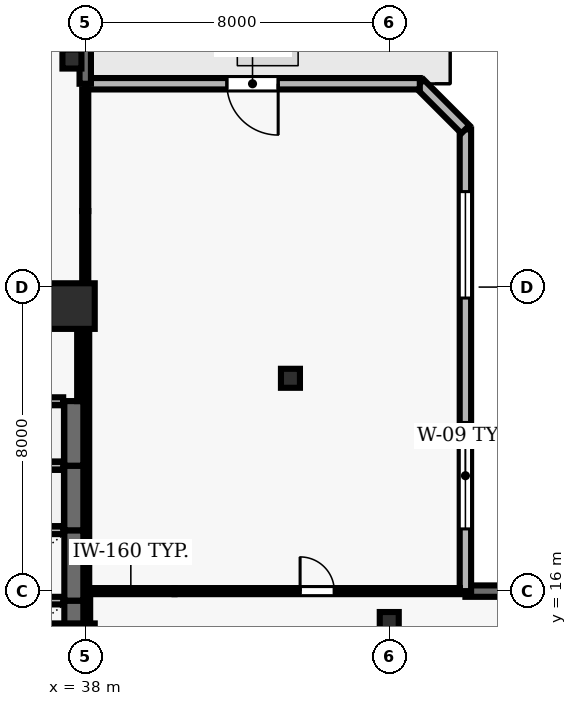
"""IFC4 building model, lengths in metres.
Left out: names, types, materials, properties, quantities, classifications, styles, units other than length and angle.
Written with IfcOpenShell. Run it as: python <this file> out.ifc"""

import sys

from ifc_helpers import new_model, si_unit, direction, frame, frame_2d, origin, origin_2d, place, context, subcontext, project, spatial, rectangle, hollow_rectangle, extrude, element, fill, save


model = new_model("IFC4")
c1 = context("Model", 3, precision=1e-05, world=origin(), true_north=direction((0.0, 1.0)))
c2 = subcontext(c1, "Body", "Model", "MODEL_VIEW")
j1 = project(units=[si_unit("LENGTHUNIT", "METRE"), si_unit("PLANEANGLEUNIT", "RADIAN")], contexts=[c1])
p1 = place(None, origin())
s1 = spatial("IfcSite", under=j1, at=p1, CompositionType="ELEMENT")
p2 = place(p1, origin())
s2 = spatial("IfcBuilding", under=s1, at=p2, CompositionType="ELEMENT")
p3 = place(p2, frame((0.0, 0.0, 115.1)))
s3 = spatial("IfcBuildingStorey", under=s2, at=p3, CompositionType="ELEMENT", Elevation=115.1)
for number, where, z_axis, x_axis in (
    (1, (37.65, 14.55, 0.0), (0.0, 0.0, 1.0), (1.0, 0.0, 0.0)),
    (2, (37.65, 23.5, 0.0), (0.0, 0.0, 1.0), (1.0, 0.0, 0.0)),
):
    element("IfcColumn", number, at=place(p3, frame(where, z_axis=z_axis, x_axis=x_axis)), inside=s3, PredefinedType="COLUMN", context=c2, shape_type="SweptSolid", body=[
        extrude(rectangle(XDim=1.2, YDim=1.2, at=origin_2d()), origin(), (0.0, 0.0, 1.0), 3.9),
    ])
for number, where, z_axis, x_axis in (
    (3, (46.0, 15.2, 0.0), (0.0, 0.0, 1.0), (1.0, 0.0, 0.0)),
    (4, (37.65, 30.0, 0.0), (0.0, 0.0, 1.0), (1.0, 0.0, 0.0)),
    (5, (43.4, 21.6, 0.0), (0.0, 0.0, 1.0), (1.0, 0.0, 0.0)),
):
    element("IfcColumn", number, at=place(p3, frame(where, z_axis=z_axis, x_axis=x_axis)), inside=s3, PredefinedType="COLUMN", context=c2, shape_type="SweptSolid", body=[
        extrude(hollow_rectangle(XDim=0.5, YDim=0.5, WallThickness=0.025, at=origin_2d()), origin(), (0.0, 0.0, 1.0), 3.9),
    ])
p4 = place(p3, frame((68.1, 16.0, 0.0), z_axis=(0.0, 0.0, 1.0), x_axis=(-1.0, 0.0, 0.0)))
e6 = element("IfcWall", 6, at=p4, inside=s3, PredefinedType="SOLIDWALL", context=c2, shape_type="SweptSolid", body=[
    extrude(rectangle(XDim=20.096, YDim=0.3, at=frame_2d((10.048, 0.0))), origin(), (0.0, 0.0, 1.0), 3.69),
])
p5 = place(p4, frame((6.922, 0.0, 0.0)))
e7 = element("IfcOpeningElement", 7, at=p5, cuts=e6, PredefinedType="OPENING", context=c2, shape_type="SweptSolid", body=[
    extrude(rectangle(XDim=1.0, YDim=2.2, at=frame_2d((0.5, 1.1))), frame((0.0, 0.16, 0.0), z_axis=(0.0, -1.0, 0.0), x_axis=(1.0, 0.0, 0.0)), (0.0, 0.0, 1.0), 0.32),
])
p6 = place(p4, frame((2.149, 0.0, 0.9)))
e8 = element("IfcOpeningElement", 8, at=p6, cuts=e6, PredefinedType="OPENING", context=c2, shape_type="SweptSolid", body=[
    extrude(rectangle(XDim=2.4, YDim=1.8, at=frame_2d((1.2, 0.9))), frame((0.0, 0.16, 0.0), z_axis=(0.0, -1.0, 0.0), x_axis=(1.0, 0.0, 0.0)), (0.0, 0.0, 1.0), 0.32),
])
p7 = place(p4, frame((8.848, 0.0, 0.9)))
e9 = element("IfcOpeningElement", 9, at=p7, cuts=e6, PredefinedType="OPENING", context=c2, shape_type="SweptSolid", body=[
    extrude(rectangle(XDim=2.4, YDim=1.8, at=frame_2d((1.2, 0.9))), frame((0.0, 0.16, 0.0), z_axis=(0.0, -1.0, 0.0), x_axis=(1.0, 0.0, 0.0)), (0.0, 0.0, 1.0), 0.32),
])
p8 = place(p4, frame((15.547, 0.0, 0.9)))
e10 = element("IfcOpeningElement", 10, at=p8, cuts=e6, PredefinedType="OPENING", context=c2, shape_type="SweptSolid", body=[
    extrude(rectangle(XDim=2.4, YDim=1.8, at=frame_2d((1.2, 0.9))), frame((0.0, 0.16, 0.0), z_axis=(0.0, -1.0, 0.0), x_axis=(1.0, 0.0, 0.0)), (0.0, 0.0, 1.0), 0.32),
])
p9 = place(p3, frame((48.004, 16.0, 0.0), z_axis=(0.0, 0.0, 1.0), x_axis=(0.0, 1.0, 0.0)))
e11 = element("IfcWall", 11, at=p9, inside=s3, PredefinedType="SOLIDWALL", context=c2, shape_type="SweptSolid", body=[
    extrude(rectangle(XDim=12.15, YDim=0.3, at=frame_2d((6.075, 0.0))), origin(), (0.0, 0.0, 1.0), 3.69),
])
p10 = place(p9, frame((1.637, 0.0, 0.9)))
e12 = element("IfcOpeningElement", 12, at=p10, cuts=e11, PredefinedType="OPENING", context=c2, shape_type="SweptSolid", body=[
    extrude(rectangle(XDim=2.8, YDim=1.8, at=frame_2d((1.4, 0.9))), frame((0.0, 0.16, 0.0), z_axis=(0.0, -1.0, 0.0), x_axis=(1.0, 0.0, 0.0)), (0.0, 0.0, 1.0), 0.32),
])
p11 = place(p9, frame((7.712, 0.0, 0.9)))
e13 = element("IfcOpeningElement", 13, at=p11, cuts=e11, PredefinedType="OPENING", context=c2, shape_type="SweptSolid", body=[
    extrude(rectangle(XDim=2.8, YDim=1.8, at=frame_2d((1.4, 0.9))), frame((0.0, 0.16, 0.0), z_axis=(0.0, -1.0, 0.0), x_axis=(1.0, 0.0, 0.0)), (0.0, 0.0, 1.0), 0.32),
])
p12 = place(p3, frame((48.004, 28.15, 0.0), z_axis=(0.0, 0.0, 1.0), x_axis=(-0.707034851297, 0.707178703759, 0.0)))
e14 = element("IfcWall", 14, at=p12, inside=s3, PredefinedType="SOLIDWALL", context=c2, shape_type="SweptSolid", body=[
    extrude(rectangle(XDim=1.697, YDim=0.3, at=frame_2d((0.849, 0.0))), origin(), (0.0, 0.0, 1.0), 3.69),
])
p13 = place(p3, frame((46.804, 29.35, 0.0), z_axis=(0.0, 0.0, 1.0), x_axis=(-1.0, 0.0, 0.0)))
e15 = element("IfcWall", 15, at=p13, inside=s3, PredefinedType="SOLIDWALL", context=c2, shape_type="SweptSolid", body=[
    extrude(rectangle(XDim=8.804, YDim=0.3, at=frame_2d((4.402, 0.0))), origin(), (0.0, 0.0, 1.0), 3.69),
])
p14 = place(p13, frame((3.727, 0.0, 0.0)))
e16 = element("IfcOpeningElement", 16, at=p14, cuts=e15, PredefinedType="OPENING", context=c2, shape_type="SweptSolid", body=[
    extrude(rectangle(XDim=1.35, YDim=2.2, at=frame_2d((0.675, 1.1))), frame((0.0, 0.16, 0.0), z_axis=(0.0, -1.0, 0.0), x_axis=(1.0, 0.0, 0.0)), (0.0, 0.0, 1.0), 0.32),
])
p15 = place(p3, frame((38.0, 29.35, 0.0), z_axis=(0.0, 0.0, 1.0), x_axis=(0.0, 1.0, 0.0)))
e17 = element("IfcWall", 17, at=p15, inside=s3, PredefinedType="SOLIDWALL", context=c2, shape_type="SweptSolid", body=[
    extrude(rectangle(XDim=16.75, YDim=0.3, at=frame_2d((8.375, 0.0))), origin(), (0.0, 0.0, 1.0), 3.69),
])
p16 = place(p15, frame((8.7, 0.0, 0.0)))
e18 = element("IfcOpeningElement", 18, at=p16, cuts=e17, PredefinedType="OPENING", context=c2, shape_type="SweptSolid", body=[
    extrude(rectangle(XDim=1.0, YDim=2.2, at=frame_2d((0.5, 1.1))), frame((0.0, 0.16, 0.0), z_axis=(0.0, -1.0, 0.0), x_axis=(1.0, 0.0, 0.0)), (0.0, 0.0, 1.0), 0.32),
])
p17 = place(p15, frame((1.292, 0.0, 0.9)))
e19 = element("IfcOpeningElement", 19, at=p17, cuts=e17, PredefinedType="OPENING", context=c2, shape_type="SweptSolid", body=[
    extrude(rectangle(XDim=3.0, YDim=2.2, at=frame_2d((1.5, 1.1))), frame((0.0, 0.16, 0.0), z_axis=(0.0, -1.0, 0.0), x_axis=(1.0, 0.0, 0.0)), (0.0, 0.0, 1.0), 0.32),
])
p18 = place(p15, frame((12.458, 0.0, 0.9)))
e20 = element("IfcOpeningElement", 20, at=p18, cuts=e17, PredefinedType="OPENING", context=c2, shape_type="SweptSolid", body=[
    extrude(rectangle(XDim=3.0, YDim=2.2, at=frame_2d((1.5, 1.1))), frame((0.0, 0.16, 0.0), z_axis=(0.0, -1.0, 0.0), x_axis=(1.0, 0.0, 0.0)), (0.0, 0.0, 1.0), 0.32),
])
p19 = place(p3, frame((37.7, 13.9, 0.0), z_axis=(0.0, 0.0, 1.0), x_axis=(0.0, 1.0, 0.0)))
e21 = element("IfcWall", 21, at=p19, inside=s3, PredefinedType="SHEAR", context=c2, shape_type="SweptSolid", body=[
    extrude(rectangle(XDim=1.85, YDim=0.5, at=frame_2d((0.925, 0.0))), origin(), (0.0, 0.0, 1.0), 3.69),
])
p20 = place(p3, frame((37.42, 15.75, 0.0), z_axis=(0.0, 0.0, 1.0), x_axis=(-1.0, 0.0, 0.0)))
e22 = element("IfcWall", 22, at=p20, inside=s3, PredefinedType="SOLIDWALL", context=c2, shape_type="SweptSolid", body=[
    extrude(rectangle(XDim=2.14, YDim=0.2, at=frame_2d((1.07, 0.0))), origin(), (0.0, 0.0, 1.0), 3.69),
])
p21 = place(p3, frame((37.7, 15.75, 0.0), z_axis=(0.0, 0.0, 1.0), x_axis=(0.0, 1.0, 0.0)))
e23 = element("IfcWall", 23, at=p21, inside=s3, PredefinedType="SHEAR", context=c2, shape_type="SweptSolid", body=[
    extrude(rectangle(XDim=1.85, YDim=0.5, at=frame_2d((0.925, 0.0))), origin(), (0.0, 0.0, 1.0), 3.69),
])
p22 = place(p3, frame((37.42, 17.6, 0.0), z_axis=(0.0, 0.0, 1.0), x_axis=(-1.0, 0.0, 0.0)))
e24 = element("IfcWall", 24, at=p22, inside=s3, PredefinedType="SOLIDWALL", context=c2, shape_type="SweptSolid", body=[
    extrude(rectangle(XDim=2.14, YDim=0.2, at=frame_2d((1.07, 0.0))), origin(), (0.0, 0.0, 1.0), 3.69),
])
p23 = place(p3, frame((37.7, 17.6, 0.0), z_axis=(0.0, 0.0, 1.0), x_axis=(0.0, 1.0, 0.0)))
e25 = element("IfcWall", 25, at=p23, inside=s3, PredefinedType="SHEAR", context=c2, shape_type="SweptSolid", body=[
    extrude(rectangle(XDim=1.7, YDim=0.5, at=frame_2d((0.85, 0.0))), origin(), (0.0, 0.0, 1.0), 3.69),
])
p24 = place(p3, frame((37.42, 19.3, 0.0), z_axis=(0.0, 0.0, 1.0), x_axis=(-1.0, 0.0, 0.0)))
e26 = element("IfcWall", 26, at=p24, inside=s3, PredefinedType="SOLIDWALL", context=c2, shape_type="SweptSolid", body=[
    extrude(rectangle(XDim=2.14, YDim=0.2, at=frame_2d((1.07, 0.0))), origin(), (0.0, 0.0, 1.0), 3.69),
])
p25 = place(p3, frame((37.7, 19.3, 0.0), z_axis=(0.0, 0.0, 1.0), x_axis=(0.0, 1.0, 0.0)))
e27 = element("IfcWall", 27, at=p25, inside=s3, PredefinedType="SHEAR", context=c2, shape_type="SweptSolid", body=[
    extrude(rectangle(XDim=1.7, YDim=0.5, at=frame_2d((0.85, 0.0))), origin(), (0.0, 0.0, 1.0), 3.69),
])
p26 = place(p3, frame((37.42, 21.0, 0.0), z_axis=(0.0, 0.0, 1.0), x_axis=(-1.0, 0.0, 0.0)))
e28 = element("IfcWall", 28, at=p26, inside=s3, PredefinedType="SOLIDWALL", context=c2, shape_type="SweptSolid", body=[
    extrude(rectangle(XDim=2.14, YDim=0.2, at=frame_2d((1.07, 0.0))), origin(), (0.0, 0.0, 1.0), 3.69),
])
p27 = place(p3, frame((37.85, 23.85, 0.0), z_axis=(0.0, 0.0, 1.0), x_axis=(-1.0, 0.0, 0.0)))
e29 = element("IfcWall", 29, at=p27, inside=s3, PredefinedType="PARTITIONING", context=c2, shape_type="SweptSolid", body=[
    extrude(rectangle(XDim=4.0, YDim=0.16, at=frame_2d((2.0, 0.0))), origin(), (0.0, 0.0, 1.0), 3.073),
])
p28 = place(p27, frame((2.25, 0.0, 0.0)))
e30 = element("IfcOpeningElement", 30, at=p28, cuts=e29, PredefinedType="OPENING", context=c2, shape_type="SweptSolid", body=[
    extrude(rectangle(XDim=0.9, YDim=2.1, at=frame_2d((0.45, 1.05))), frame((0.0, 0.09, 0.0), z_axis=(0.0, -1.0, 0.0), x_axis=(1.0, 0.0, 0.0)), (0.0, 0.0, 1.0), 0.18),
])
p29 = place(p3, frame((40.35, 16.0, 0.0), z_axis=(0.0, 0.0, 1.0), x_axis=(-1.0, 0.0, 0.0)))
e31 = element("IfcWall", 31, at=p29, inside=s3, PredefinedType="PARTITIONING", context=c2, shape_type="SweptSolid", body=[
    extrude(rectangle(XDim=2.3, YDim=0.16, at=frame_2d((1.15, 0.0))), origin(), (0.0, 0.0, 1.0), 3.69),
])
p30 = place(p3, frame((40.35, 16.0, 0.0), z_axis=(0.0, 0.0, 1.0), x_axis=(1.0, 0.0, 0.0)))
e32 = element("IfcWall", 32, at=p30, inside=s3, PredefinedType="PARTITIONING", context=c2, shape_type="SweptSolid", body=[
    extrude(rectangle(XDim=7.509, YDim=0.16, at=frame_2d((3.754, 0.0))), origin(), (0.0, 0.0, 1.0), 3.39),
])
p31 = place(p30, frame((3.304, 0.0, 0.0)))
e33 = element("IfcOpeningElement", 33, at=p31, cuts=e32, PredefinedType="OPENING", context=c2, shape_type="SweptSolid", body=[
    extrude(rectangle(XDim=0.9, YDim=2.1, at=frame_2d((0.45, 1.05))), frame((0.0, 0.09, 0.0), z_axis=(0.0, -1.0, 0.0), x_axis=(1.0, 0.0, 0.0)), (0.0, 0.0, 1.0), 0.18),
])
p32 = place(p3, frame((37.85, 21.0, 0.0), z_axis=(0.0, 0.0, 1.0), x_axis=(0.0, 1.0, 0.0)))
e34 = element("IfcWall", 34, at=p32, inside=s3, PredefinedType="PARTITIONING", context=c2, shape_type="SweptSolid", body=[
    extrude(rectangle(XDim=2.775, YDim=0.125, at=frame_2d((1.387, 0.0))), origin(), (0.0, 0.0, 1.0), 3.073),
])
p33 = place(p3, frame((38.0, 23.85, 0.0), z_axis=(0.0, 0.0, 1.0), x_axis=(0.0, 1.0, 0.0)))
e35 = element("IfcWall", 35, at=p33, inside=s3, PredefinedType="PARTITIONING", context=c2, shape_type="SweptSolid", body=[
    extrude(rectangle(XDim=2.15, YDim=0.16, at=frame_2d((1.075, 0.0))), origin(), (0.0, 0.0, 1.0), 3.073),
])
p34 = place(p3, frame((38.0, 26.0, 0.0), z_axis=(0.0, 0.0, 1.0), x_axis=(0.0, 1.0, 0.0)))
e36 = element("IfcWall", 36, at=p34, inside=s3, PredefinedType="PARTITIONING", context=c2, shape_type="SweptSolid", body=[
    extrude(rectangle(XDim=3.205, YDim=0.16, at=frame_2d((1.603, 0.0))), origin(), (0.0, 0.0, 1.0), 3.073),
])
p35 = place(p3, frame((38.05, 15.925, 0.0), z_axis=(0.0, 0.0, 1.0), x_axis=(0.0, -1.0, 0.0)))
e37 = element("IfcWall", 37, at=p35, inside=s3, PredefinedType="PARTITIONING", context=c2, shape_type="SweptSolid", body=[
    extrude(rectangle(XDim=6.375, YDim=0.16, at=frame_2d((3.188, 0.0))), origin(), (0.0, 0.0, 1.0), 3.073),
])
p36 = place(p3, frame((38.05, 23.85, 0.0), z_axis=(0.0, 0.0, 1.0), x_axis=(0.0, -1.0, 0.0)))
e38 = element("IfcWall", 38, at=p36, inside=s3, PredefinedType="MOVABLE", context=c2, shape_type="SweptSolid", body=[
    extrude(rectangle(XDim=7.775, YDim=0.11, at=frame_2d((3.888, 0.0))), origin(), (0.0, 0.0, 1.0), 3.073),
])
p37 = place(p10, origin())
e39 = element("IfcWindow", 39, at=p37, inside=s3, PartitioningType="SINGLE_PANEL", PredefinedType="WINDOW", context=c2, shape_type="SweptSolid", body=[
    extrude(rectangle(XDim=2.8, YDim=1.8, at=frame_2d((1.4, 0.9))), frame((0.0, 0.03, 0.0), z_axis=(0.0, -1.0, 0.0), x_axis=(1.0, 0.0, 0.0)), (0.0, 0.0, 1.0), 0.06),
])
fill(e12, e39)
p38 = place(p11, origin())
e40 = element("IfcWindow", 40, at=p38, inside=s3, PartitioningType="SINGLE_PANEL", PredefinedType="WINDOW", context=c2, shape_type="SweptSolid", body=[
    extrude(rectangle(XDim=2.8, YDim=1.8, at=frame_2d((1.4, 0.9))), frame((0.0, 0.03, 0.0), z_axis=(0.0, -1.0, 0.0), x_axis=(1.0, 0.0, 0.0)), (0.0, 0.0, 1.0), 0.06),
])
fill(e13, e40)
p39 = place(p14, origin())
e41 = element("IfcDoor", 41, at=p39, inside=s3, OperationType="SINGLE_SWING_LEFT", PredefinedType="DOOR", context=c2, shape_type="SweptSolid", body=[
    extrude(rectangle(XDim=1.35, YDim=2.2, at=frame_2d((0.675, 1.1))), frame((0.0, 0.025, 0.0), z_axis=(0.0, -1.0, 0.0), x_axis=(1.0, 0.0, 0.0)), (0.0, 0.0, 1.0), 0.05),
])
fill(e16, e41)
p40 = place(p31, origin())
e42 = element("IfcDoor", 42, at=p40, inside=s3, OperationType="SINGLE_SWING_LEFT", PredefinedType="DOOR", context=c2, shape_type="SweptSolid", body=[
    extrude(rectangle(XDim=0.9, YDim=2.1, at=frame_2d((0.45, 1.05))), frame((0.0, 0.025, 0.0), z_axis=(0.0, -1.0, 0.0), x_axis=(1.0, 0.0, 0.0)), (0.0, 0.0, 1.0), 0.05),
])
fill(e33, e42)
save(model, sys.argv[1])
